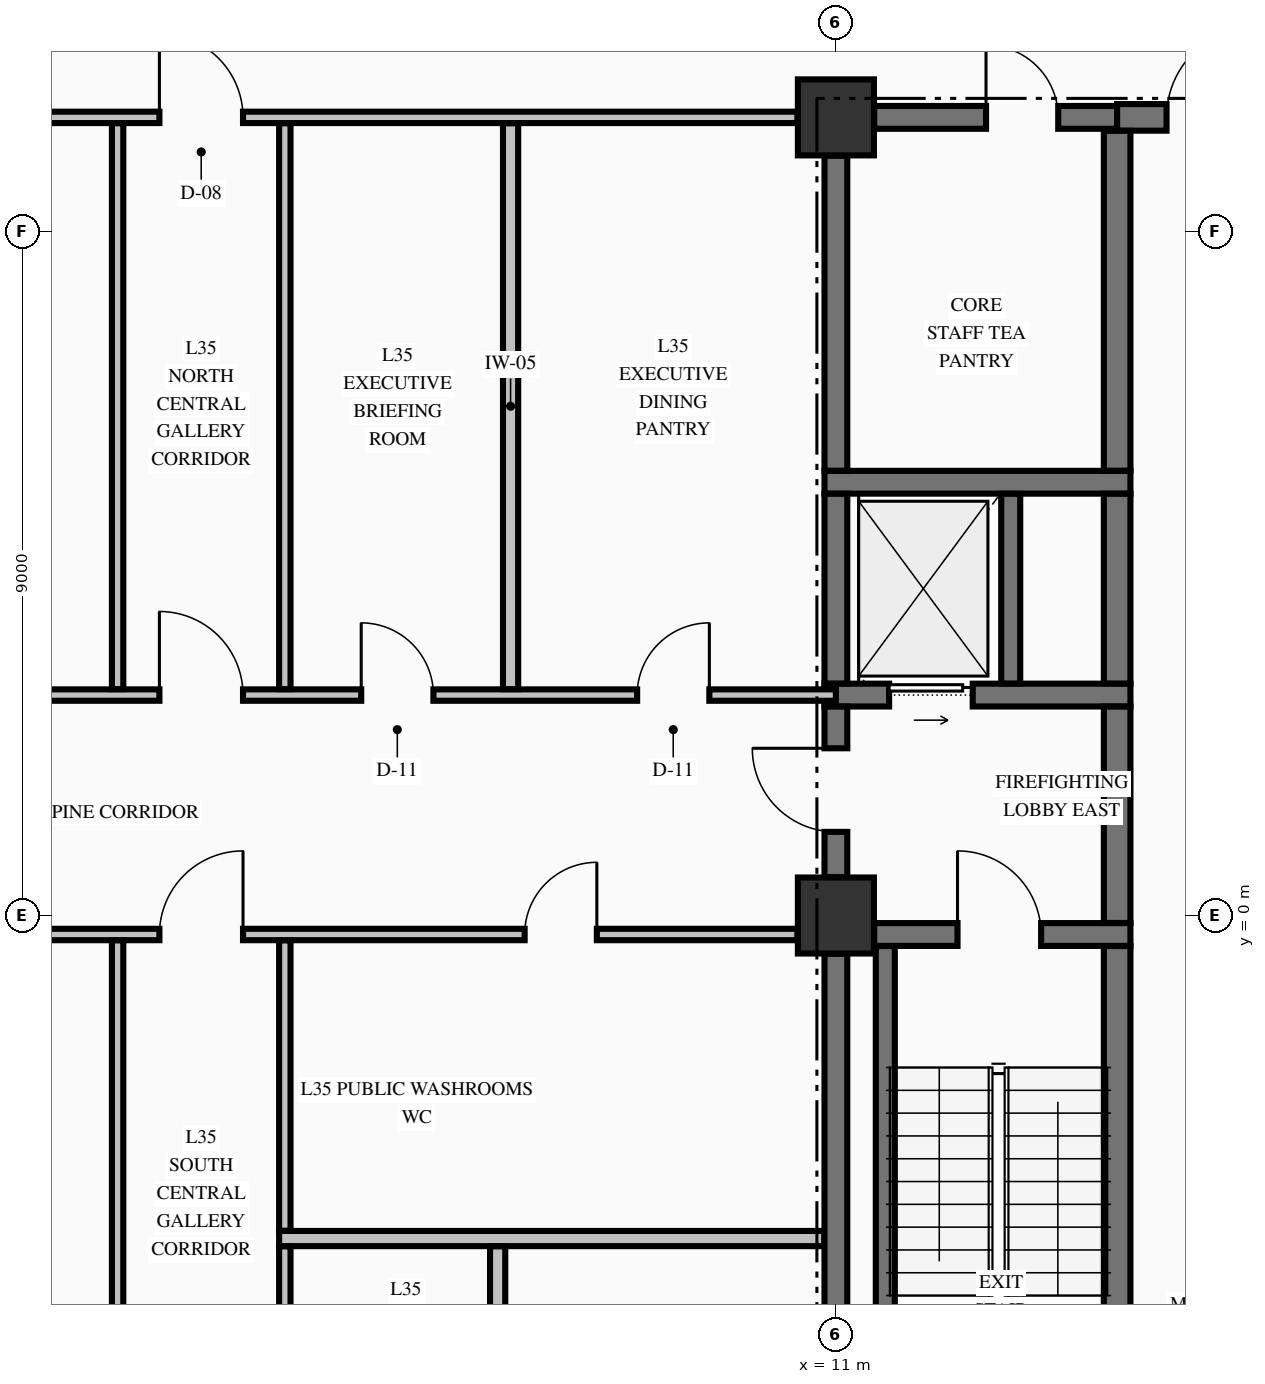
"""IFC4 building model, lengths in metres.
Left out: names, types, materials, properties, quantities, classifications, styles, units other than length and angle.
Written with IfcOpenShell. Run it as: python <this file> out.ifc"""

import sys

from ifc_helpers import new_model, si_unit, direction, frame, frame_2d, origin, origin_2d, place, context, subcontext, project, spatial, rectangle, extrude, element, fill, save


model = new_model("IFC4")
c1 = context("Model", 3, precision=1e-05, world=origin(), true_north=direction((0.0, 1.0)))
c2 = subcontext(c1, "Body", "Model", "MODEL_VIEW")
j1 = project(units=[si_unit("LENGTHUNIT", "METRE"), si_unit("PLANEANGLEUNIT", "RADIAN")], contexts=[c1])
p1 = place(None, origin())
s1 = spatial("IfcSite", under=j1, at=p1, CompositionType="ELEMENT")
p2 = place(p1, origin())
s2 = spatial("IfcBuilding", under=s1, at=p2, CompositionType="ELEMENT")
p3 = place(p2, frame((0.0, 0.0, 139.2)))
s3 = spatial("IfcBuildingStorey", under=s2, at=p3, CompositionType="ELEMENT", Elevation=139.2)
for number, where, z_axis, x_axis in (
    (1, (11.0, 0.0, -0.25), (0.0, 0.0, 1.0), (1.0, 0.0, 0.0)),
    (2, (11.0, 10.5, -0.25), (0.0, 0.0, 1.0), (1.0, 0.0, 0.0)),
):
    element("IfcColumn", number, at=place(p3, frame(where, z_axis=z_axis, x_axis=x_axis)), inside=s3, PredefinedType="COLUMN", context=c2, shape_type="SweptSolid", body=[
        extrude(rectangle(XDim=1.0, YDim=1.0, at=origin_2d()), origin(), (0.0, 0.0, 1.0), 3.495),
    ])
p4 = place(p3, frame((11.504, -0.25, 0.0), z_axis=(0.0, 0.0, 1.0), x_axis=(1.0, 0.0, 0.0)))
e3 = element("IfcWall", 3, at=p4, inside=s3, PredefinedType="SHEAR", context=c2, shape_type="SweptSolid", body=[
    extrude(rectangle(XDim=3.371, YDim=0.3, at=frame_2d((1.686, 0.0))), origin(), (0.0, 0.0, 1.0), 3.245),
])
p5 = place(p4, frame((1.096, 0.0, 0.0)))
e4 = element("IfcOpeningElement", 4, at=p5, cuts=e3, PredefinedType="OPENING", context=c2, shape_type="SweptSolid", body=[
    extrude(rectangle(XDim=1.1, YDim=2.15, at=frame_2d((0.55, 1.075))), frame((0.0, 0.16, 0.0), z_axis=(0.0, -1.0, 0.0), x_axis=(1.0, 0.0, 0.0)), (0.0, 0.0, 1.0), 0.32),
])
p6 = place(p3, frame((10.85, 2.9, 0.0), z_axis=(0.0, 0.0, 1.0), x_axis=(1.0, 0.0, 0.0)))
e5 = element("IfcWall", 5, at=p6, inside=s3, PredefinedType="SHEAR", context=c2, shape_type="SweptSolid", body=[
    extrude(rectangle(XDim=4.025, YDim=0.3, at=frame_2d((2.012, 0.0))), origin(), (0.0, 0.0, 1.0), 3.245),
])
p7 = place(p6, frame((0.85, 0.0, 0.0)))
e6 = element("IfcOpeningElement", 6, at=p7, cuts=e5, PredefinedType="OPENING", context=c2, shape_type="SweptSolid", body=[
    extrude(rectangle(XDim=1.1, YDim=2.2, at=frame_2d((0.55, 1.1))), frame((0.0, 0.16, 0.0), z_axis=(0.0, -1.0, 0.0), x_axis=(1.0, 0.0, 0.0)), (0.0, 0.0, 1.0), 0.32),
])
p8 = place(p3, frame((10.85, 5.7, 0.0), z_axis=(0.0, 0.0, 1.0), x_axis=(1.0, 0.0, 0.0)))
e7 = element("IfcWall", 7, at=p8, inside=s3, PredefinedType="SHEAR", context=c2, shape_type="SweptSolid", body=[
    extrude(rectangle(XDim=4.025, YDim=0.3, at=frame_2d((2.012, 0.0))), origin(), (0.0, 0.0, 1.0), 3.245),
])
p9 = place(p3, frame((11.504, 10.5, 0.0), z_axis=(0.0, 0.0, 1.0), x_axis=(1.0, 0.0, 0.0)))
e8 = element("IfcWall", 8, at=p9, inside=s3, PredefinedType="SHEAR", context=c2, shape_type="SweptSolid", body=[
    extrude(rectangle(XDim=3.196, YDim=0.3, at=frame_2d((1.598, 0.0))), origin(), (0.0, 0.0, 1.0), 3.245),
])
p10 = place(p9, frame((1.471, 0.0, 0.0)))
e9 = element("IfcOpeningElement", 9, at=p10, cuts=e8, PredefinedType="OPENING", context=c2, shape_type="SweptSolid", body=[
    extrude(rectangle(XDim=0.95, YDim=2.15, at=frame_2d((0.475, 1.075))), frame((0.0, 0.16, 0.0), z_axis=(0.0, -1.0, 0.0), x_axis=(1.0, 0.0, 0.0)), (0.0, 0.0, 1.0), 0.32),
])
p11 = place(p3, frame((14.7, 10.5, 0.0), z_axis=(0.0, 0.0, 1.0), x_axis=(1.0, 0.0, 0.0)))
e10 = element("IfcWall", 10, at=p11, inside=s3, PredefinedType="SHEAR", context=c2, shape_type="SweptSolid", body=[
    extrude(rectangle(XDim=4.796, YDim=0.35, at=frame_2d((2.398, 0.0))), origin(), (0.0, 0.0, 1.0), 3.245),
])
p12 = place(p11, frame((0.65, 0.0, 0.0)))
e11 = element("IfcOpeningElement", 11, at=p12, cuts=e10, PredefinedType="OPENING", context=c2, shape_type="SweptSolid", body=[
    extrude(rectangle(XDim=1.2, YDim=2.15, at=frame_2d((0.6, 1.075))), frame((0.0, 0.185, 0.0), z_axis=(0.0, -1.0, 0.0), x_axis=(1.0, 0.0, 0.0)), (0.0, 0.0, 1.0), 0.37),
])
p13 = place(p11, frame((3.225, 0.0, 0.0)))
e12 = element("IfcOpeningElement", 12, at=p13, cuts=e10, PredefinedType="OPENING", context=c2, shape_type="SweptSolid", body=[
    extrude(rectangle(XDim=0.95, YDim=2.15, at=frame_2d((0.475, 1.075))), frame((0.0, 0.185, 0.0), z_axis=(0.0, -1.0, 0.0), x_axis=(1.0, 0.0, 0.0)), (0.0, 0.0, 1.0), 0.37),
])
p14 = place(p3, frame((3.675, -4.25, 0.0), z_axis=(0.0, 0.0, 1.0), x_axis=(1.0, 0.0, 0.0)))
e13 = element("IfcWall", 13, at=p14, inside=s3, PredefinedType="PARTITIONING", context=c2, shape_type="SweptSolid", body=[
    extrude(rectangle(XDim=7.172, YDim=0.2, at=frame_2d((3.586, 0.0))), origin(), (0.0, 0.0, 1.0), 3.245),
])
p15 = place(p3, frame((-10.494, -0.25, 0.0), z_axis=(0.0, 0.0, 1.0), x_axis=(1.0, 0.0, 0.0)))
e14 = element("IfcWall", 14, at=p15, inside=s3, PredefinedType="PARTITIONING", context=c2, shape_type="SweptSolid", body=[
    extrude(rectangle(XDim=20.988, YDim=0.15, at=frame_2d((10.494, 0.0))), origin(), (0.0, 0.0, 1.0), 3.245),
])
p16 = place(p15, frame((12.594, 0.0, 0.0)))
e15 = element("IfcOpeningElement", 15, at=p16, cuts=e14, PredefinedType="OPENING", context=c2, shape_type="SweptSolid", body=[
    extrude(rectangle(XDim=1.1, YDim=2.15, at=frame_2d((0.55, 1.075))), frame((0.0, 0.085, 0.0), z_axis=(0.0, -1.0, 0.0), x_axis=(1.0, 0.0, 0.0)), (0.0, 0.0, 1.0), 0.17),
])
p17 = place(p15, frame((5.249, 0.0, 0.0)))
e16 = element("IfcOpeningElement", 16, at=p17, cuts=e14, PredefinedType="OPENING", context=c2, shape_type="SweptSolid", body=[
    extrude(rectangle(XDim=1.05, YDim=2.15, at=frame_2d((0.525, 1.075))), frame((0.0, 0.085, 0.0), z_axis=(0.0, -1.0, 0.0), x_axis=(1.0, 0.0, 0.0)), (0.0, 0.0, 1.0), 0.17),
])
p18 = place(p15, frame((17.399, 0.0, 0.0)))
e17 = element("IfcOpeningElement", 17, at=p18, cuts=e14, PredefinedType="OPENING", context=c2, shape_type="SweptSolid", body=[
    extrude(rectangle(XDim=0.95, YDim=2.15, at=frame_2d((0.475, 1.075))), frame((0.0, 0.085, 0.0), z_axis=(0.0, -1.0, 0.0), x_axis=(1.0, 0.0, 0.0)), (0.0, 0.0, 1.0), 0.17),
])
p19 = place(p3, frame((-11.0, 2.9, 0.0), z_axis=(0.0, 0.0, 1.0), x_axis=(1.0, 0.0, 0.0)))
e18 = element("IfcWall", 18, at=p19, inside=s3, PredefinedType="PARTITIONING", context=c2, shape_type="SweptSolid", body=[
    extrude(rectangle(XDim=22.0, YDim=0.15, at=frame_2d((11.0, 0.0))), origin(), (0.0, 0.0, 1.0), 3.245),
])
p20 = place(p19, frame((13.1, 0.0, 0.0)))
e19 = element("IfcOpeningElement", 19, at=p20, cuts=e18, PredefinedType="OPENING", context=c2, shape_type="SweptSolid", body=[
    extrude(rectangle(XDim=1.1, YDim=2.15, at=frame_2d((0.55, 1.075))), frame((0.0, 0.085, 0.0), z_axis=(0.0, -1.0, 0.0), x_axis=(1.0, 0.0, 0.0)), (0.0, 0.0, 1.0), 0.17),
])
p21 = place(p19, frame((5.755, 0.0, 0.0)))
e20 = element("IfcOpeningElement", 20, at=p21, cuts=e18, PredefinedType="OPENING", context=c2, shape_type="SweptSolid", body=[
    extrude(rectangle(XDim=1.05, YDim=2.15, at=frame_2d((0.525, 1.075))), frame((0.0, 0.085, 0.0), z_axis=(0.0, -1.0, 0.0), x_axis=(1.0, 0.0, 0.0)), (0.0, 0.0, 1.0), 0.17),
])
p22 = place(p19, frame((15.755, 0.0, 0.0)))
e21 = element("IfcOpeningElement", 21, at=p22, cuts=e18, PredefinedType="OPENING", context=c2, shape_type="SweptSolid", body=[
    extrude(rectangle(XDim=0.95, YDim=2.15, at=frame_2d((0.475, 1.075))), frame((0.0, 0.085, 0.0), z_axis=(0.0, -1.0, 0.0), x_axis=(1.0, 0.0, 0.0)), (0.0, 0.0, 1.0), 0.17),
])
p23 = place(p19, frame((19.385, 0.0, 0.0)))
e22 = element("IfcOpeningElement", 22, at=p23, cuts=e18, PredefinedType="OPENING", context=c2, shape_type="SweptSolid", body=[
    extrude(rectangle(XDim=0.95, YDim=2.15, at=frame_2d((0.475, 1.075))), frame((0.0, 0.085, 0.0), z_axis=(0.0, -1.0, 0.0), x_axis=(1.0, 0.0, 0.0)), (0.0, 0.0, 1.0), 0.17),
])
p24 = place(p3, frame((-10.494, 10.5, 0.0), z_axis=(0.0, 0.0, 1.0), x_axis=(1.0, 0.0, 0.0)))
e23 = element("IfcWall", 23, at=p24, inside=s3, PredefinedType="PARTITIONING", context=c2, shape_type="SweptSolid", body=[
    extrude(rectangle(XDim=20.988, YDim=0.15, at=frame_2d((10.494, 0.0))), origin(), (0.0, 0.0, 1.0), 3.245),
])
p25 = place(p24, frame((12.594, 0.0, 0.0)))
e24 = element("IfcOpeningElement", 24, at=p25, cuts=e23, PredefinedType="OPENING", context=c2, shape_type="SweptSolid", body=[
    extrude(rectangle(XDim=1.1, YDim=2.15, at=frame_2d((0.55, 1.075))), frame((0.0, 0.085, 0.0), z_axis=(0.0, -1.0, 0.0), x_axis=(1.0, 0.0, 0.0)), (0.0, 0.0, 1.0), 0.17),
])
p26 = place(p3, frame((11.0, -9.446, 0.0), z_axis=(0.0, 0.0, 1.0), x_axis=(0.0, 1.0, 0.0)))
e25 = element("IfcWall", 25, at=p26, inside=s3, PredefinedType="SHEAR", context=c2, shape_type="SweptSolid", body=[
    extrude(rectangle(XDim=8.942, YDim=0.3, at=frame_2d((4.471, 0.0))), origin(), (0.0, 0.0, 1.0), 3.245),
])
p27 = place(p3, frame((11.0, 0.504, 0.0), z_axis=(0.0, 0.0, 1.0), x_axis=(0.0, 1.0, 0.0)))
e26 = element("IfcWall", 26, at=p27, inside=s3, PredefinedType="SHEAR", context=c2, shape_type="SweptSolid", body=[
    extrude(rectangle(XDim=2.244, YDim=0.3, at=frame_2d((1.122, 0.0))), origin(), (0.0, 0.0, 1.0), 3.245),
])
p28 = place(p27, frame((0.596, 0.0, 0.0)))
e27 = element("IfcOpeningElement", 27, at=p28, cuts=e26, PredefinedType="OPENING", context=c2, shape_type="SweptSolid", body=[
    extrude(rectangle(XDim=1.1, YDim=2.15, at=frame_2d((0.55, 1.075))), frame((0.0, 0.16, 0.0), z_axis=(0.0, -1.0, 0.0), x_axis=(1.0, 0.0, 0.0)), (0.0, 0.0, 1.0), 0.32),
])
p29 = place(p3, frame((11.0, 3.052, 0.0), z_axis=(0.0, 0.0, 1.0), x_axis=(0.0, 1.0, 0.0)))
e28 = element("IfcWall", 28, at=p29, inside=s3, PredefinedType="SHEAR", context=c2, shape_type="SweptSolid", body=[
    extrude(rectangle(XDim=2.496, YDim=0.3, at=frame_2d((1.248, 0.0))), origin(), (0.0, 0.0, 1.0), 3.245),
])
p30 = place(p3, frame((11.0, 5.852, 0.0), z_axis=(0.0, 0.0, 1.0), x_axis=(0.0, 1.0, 0.0)))
e29 = element("IfcWall", 29, at=p30, inside=s3, PredefinedType="SHEAR", context=c2, shape_type="SweptSolid", body=[
    extrude(rectangle(XDim=4.144, YDim=0.3, at=frame_2d((2.072, 0.0))), origin(), (0.0, 0.0, 1.0), 3.245),
])
p31 = place(p3, frame((11.65, -9.798, 0.0), z_axis=(0.0, 0.0, 1.0), x_axis=(0.0, 1.0, 0.0)))
e30 = element("IfcWall", 30, at=p31, inside=s3, PredefinedType="SOLIDWALL", context=c2, shape_type="SweptSolid", body=[
    extrude(rectangle(XDim=9.396, YDim=0.25, at=frame_2d((4.698, 0.0))), origin(), (0.0, 0.0, 1.0), 3.245),
])
p32 = place(p3, frame((13.3, 3.052, 0.0), z_axis=(0.0, 0.0, 1.0), x_axis=(0.0, 1.0, 0.0)))
e31 = element("IfcWall", 31, at=p32, inside=s3, PredefinedType="SOLIDWALL", context=c2, shape_type="SweptSolid", body=[
    extrude(rectangle(XDim=2.496, YDim=0.25, at=frame_2d((1.248, 0.0))), origin(), (0.0, 0.0, 1.0), 3.245),
])
p33 = place(p3, frame((14.7, -9.773, 0.0), z_axis=(0.0, 0.0, 1.0), x_axis=(0.0, 1.0, 0.0)))
e32 = element("IfcWall", 32, at=p33, inside=s3, PredefinedType="SHEAR", context=c2, shape_type="SweptSolid", body=[
    extrude(rectangle(XDim=9.371, YDim=0.35, at=frame_2d((4.686, 0.0))), origin(), (0.0, 0.0, 1.0), 3.245),
])
p34 = place(p3, frame((14.7, -0.098, 0.0), z_axis=(0.0, 0.0, 1.0), x_axis=(0.0, 1.0, 0.0)))
e33 = element("IfcWall", 33, at=p34, inside=s3, PredefinedType="SHEAR", context=c2, shape_type="SweptSolid", body=[
    extrude(rectangle(XDim=2.846, YDim=0.35, at=frame_2d((1.423, 0.0))), origin(), (0.0, 0.0, 1.0), 3.245),
])
p35 = place(p3, frame((14.7, 3.052, 0.0), z_axis=(0.0, 0.0, 1.0), x_axis=(0.0, 1.0, 0.0)))
e34 = element("IfcWall", 34, at=p35, inside=s3, PredefinedType="SHEAR", context=c2, shape_type="SweptSolid", body=[
    extrude(rectangle(XDim=2.496, YDim=0.35, at=frame_2d((1.248, 0.0))), origin(), (0.0, 0.0, 1.0), 3.245),
])
p36 = place(p3, frame((14.7, 5.852, 0.0), z_axis=(0.0, 0.0, 1.0), x_axis=(0.0, 1.0, 0.0)))
e35 = element("IfcWall", 35, at=p36, inside=s3, PredefinedType="SHEAR", context=c2, shape_type="SweptSolid", body=[
    extrude(rectangle(XDim=4.471, YDim=0.35, at=frame_2d((2.235, 0.0))), origin(), (0.0, 0.0, 1.0), 3.245),
])
p37 = place(p3, frame((1.55, -9.872, 0.0), z_axis=(0.0, 0.0, 1.0), x_axis=(0.0, 1.0, 0.0)))
e36 = element("IfcWall", 36, at=p37, inside=s3, PredefinedType="PARTITIONING", context=c2, shape_type="SweptSolid", body=[
    extrude(rectangle(XDim=9.544, YDim=0.15, at=frame_2d((4.772, 0.0))), origin(), (0.0, 0.0, 1.0), 3.245),
])
p38 = place(p3, frame((1.55, 2.978, 0.0), z_axis=(0.0, 0.0, 1.0), x_axis=(0.0, 1.0, 0.0)))
e37 = element("IfcWall", 37, at=p38, inside=s3, PredefinedType="PARTITIONING", context=c2, shape_type="SweptSolid", body=[
    extrude(rectangle(XDim=7.444, YDim=0.15, at=frame_2d((3.722, 0.0))), origin(), (0.0, 0.0, 1.0), 3.245),
])
p39 = place(p3, frame((3.75, -9.872, 0.0), z_axis=(0.0, 0.0, 1.0), x_axis=(0.0, 1.0, 0.0)))
e38 = element("IfcWall", 38, at=p39, inside=s3, PredefinedType="PARTITIONING", context=c2, shape_type="SweptSolid", body=[
    extrude(rectangle(XDim=5.519, YDim=0.15, at=frame_2d((2.76, 0.0))), origin(), (0.0, 0.0, 1.0), 3.245),
])
p40 = place(p39, frame((1.997, 0.0, 0.0)))
e39 = element("IfcOpeningElement", 39, at=p40, cuts=e38, PredefinedType="OPENING", context=c2, shape_type="SweptSolid", body=[
    extrude(rectangle(XDim=0.95, YDim=2.15, at=frame_2d((0.475, 1.075))), frame((0.0, 0.085, 0.0), z_axis=(0.0, -1.0, 0.0), x_axis=(1.0, 0.0, 0.0)), (0.0, 0.0, 1.0), 0.17),
])
p41 = place(p3, frame((3.75, -4.147, 0.0), z_axis=(0.0, 0.0, 1.0), x_axis=(0.0, 1.0, 0.0)))
e40 = element("IfcWall", 40, at=p41, inside=s3, PredefinedType="PARTITIONING", context=c2, shape_type="SweptSolid", body=[
    extrude(rectangle(XDim=3.819, YDim=0.15, at=frame_2d((1.91, 0.0))), origin(), (0.0, 0.0, 1.0), 3.245),
])
p42 = place(p3, frame((3.75, 2.978, 0.0), z_axis=(0.0, 0.0, 1.0), x_axis=(0.0, 1.0, 0.0)))
e41 = element("IfcWall", 41, at=p42, inside=s3, PredefinedType="PARTITIONING", context=c2, shape_type="SweptSolid", body=[
    extrude(rectangle(XDim=7.444, YDim=0.15, at=frame_2d((3.722, 0.0))), origin(), (0.0, 0.0, 1.0), 3.245),
])
p43 = place(p3, frame((6.55, -9.872, 0.0), z_axis=(0.0, 0.0, 1.0), x_axis=(0.0, 1.0, 0.0)))
e42 = element("IfcWall", 42, at=p43, inside=s3, PredefinedType="PARTITIONING", context=c2, shape_type="SweptSolid", body=[
    extrude(rectangle(XDim=5.519, YDim=0.2, at=frame_2d((2.76, 0.0))), origin(), (0.0, 0.0, 1.0), 3.245),
])
p44 = place(p3, frame((6.72, 2.978, 0.0), z_axis=(0.0, 0.0, 1.0), x_axis=(0.0, 1.0, 0.0)))
e43 = element("IfcWall", 43, at=p44, inside=s3, PredefinedType="PARTITIONING", context=c2, shape_type="SweptSolid", body=[
    extrude(rectangle(XDim=7.444, YDim=0.2, at=frame_2d((3.722, 0.0))), origin(), (0.0, 0.0, 1.0), 3.245),
])
p45 = place(p5, origin())
e44 = element("IfcDoor", 44, at=p45, inside=s3, OperationType="SINGLE_SWING_LEFT", PredefinedType="DOOR", context=c2, shape_type="SweptSolid", body=[
    extrude(rectangle(XDim=1.1, YDim=2.15, at=frame_2d((0.55, 1.075))), frame((0.0, 0.025, 0.0), z_axis=(0.0, -1.0, 0.0), x_axis=(1.0, 0.0, 0.0)), (0.0, 0.0, 1.0), 0.05),
])
fill(e4, e44)
p46 = place(p28, origin())
e45 = element("IfcDoor", 45, at=p46, inside=s3, OperationType="SINGLE_SWING_RIGHT", PredefinedType="DOOR", context=c2, shape_type="SweptSolid", body=[
    extrude(rectangle(XDim=1.1, YDim=2.15, at=frame_2d((0.55, 1.075))), frame((0.0, 0.025, 0.0), z_axis=(0.0, -1.0, 0.0), x_axis=(1.0, 0.0, 0.0)), (0.0, 0.0, 1.0), 0.05),
])
fill(e27, e45)
p47 = place(p7, origin())
e46 = element("IfcDoor", 46, at=p47, inside=s3, OperationType="SLIDING_TO_RIGHT", PredefinedType="DOOR", context=c2, shape_type="SweptSolid", body=[
    extrude(rectangle(XDim=1.1, YDim=2.2, at=frame_2d((0.55, 1.1))), frame((0.0, 0.025, 0.0), z_axis=(0.0, -1.0, 0.0), x_axis=(1.0, 0.0, 0.0)), (0.0, 0.0, 1.0), 0.05),
])
fill(e6, e46)
p48 = place(p10, origin())
e47 = element("IfcDoor", 47, at=p48, inside=s3, OperationType="SINGLE_SWING_LEFT", PredefinedType="DOOR", context=c2, shape_type="SweptSolid", body=[
    extrude(rectangle(XDim=0.95, YDim=2.15, at=frame_2d((0.475, 1.075))), frame((0.0, 0.025, 0.0), z_axis=(0.0, -1.0, 0.0), x_axis=(1.0, 0.0, 0.0)), (0.0, 0.0, 1.0), 0.05),
])
fill(e9, e47)
p49 = place(p12, origin())
e48 = element("IfcDoor", 48, at=p49, inside=s3, OperationType="SINGLE_SWING_RIGHT", PredefinedType="DOOR", context=c2, shape_type="SweptSolid", body=[
    extrude(rectangle(XDim=1.2, YDim=2.15, at=frame_2d((0.6, 1.075))), frame((0.0, 0.025, 0.0), z_axis=(0.0, -1.0, 0.0), x_axis=(1.0, 0.0, 0.0)), (0.0, 0.0, 1.0), 0.05),
])
fill(e11, e48)
p50 = place(p25, origin())
e49 = element("IfcDoor", 49, at=p50, inside=s3, OperationType="SINGLE_SWING_LEFT", PredefinedType="DOOR", context=c2, shape_type="SweptSolid", body=[
    extrude(rectangle(XDim=1.1, YDim=2.15, at=frame_2d((0.55, 1.075))), frame((0.0, 0.025, 0.0), z_axis=(0.0, -1.0, 0.0), x_axis=(1.0, 0.0, 0.0)), (0.0, 0.0, 1.0), 0.05),
])
fill(e24, e49)
p51 = place(p20, origin())
e50 = element("IfcDoor", 50, at=p51, inside=s3, OperationType="SINGLE_SWING_LEFT", PredefinedType="DOOR", context=c2, shape_type="SweptSolid", body=[
    extrude(rectangle(XDim=1.1, YDim=2.15, at=frame_2d((0.55, 1.075))), frame((0.0, 0.025, 0.0), z_axis=(0.0, -1.0, 0.0), x_axis=(1.0, 0.0, 0.0)), (0.0, 0.0, 1.0), 0.05),
])
fill(e19, e50)
p52 = place(p16, origin())
e51 = element("IfcDoor", 51, at=p52, inside=s3, OperationType="SINGLE_SWING_RIGHT", PredefinedType="DOOR", context=c2, shape_type="SweptSolid", body=[
    extrude(rectangle(XDim=1.1, YDim=2.15, at=frame_2d((0.55, 1.075))), frame((0.0, 0.025, 0.0), z_axis=(0.0, -1.0, 0.0), x_axis=(1.0, 0.0, 0.0)), (0.0, 0.0, 1.0), 0.05),
])
fill(e15, e51)
p53 = place(p22, origin())
e52 = element("IfcDoor", 52, at=p53, inside=s3, OperationType="SINGLE_SWING_LEFT", PredefinedType="DOOR", context=c2, shape_type="SweptSolid", body=[
    extrude(rectangle(XDim=0.95, YDim=2.15, at=frame_2d((0.475, 1.075))), frame((0.0, 0.025, 0.0), z_axis=(0.0, -1.0, 0.0), x_axis=(1.0, 0.0, 0.0)), (0.0, 0.0, 1.0), 0.05),
])
fill(e21, e52)
p54 = place(p23, origin())
e53 = element("IfcDoor", 53, at=p54, inside=s3, OperationType="SINGLE_SWING_RIGHT", PredefinedType="DOOR", context=c2, shape_type="SweptSolid", body=[
    extrude(rectangle(XDim=0.95, YDim=2.15, at=frame_2d((0.475, 1.075))), frame((0.0, 0.025, 0.0), z_axis=(0.0, -1.0, 0.0), x_axis=(1.0, 0.0, 0.0)), (0.0, 0.0, 1.0), 0.05),
])
fill(e22, e53)
p55 = place(p18, origin())
e54 = element("IfcDoor", 54, at=p55, inside=s3, OperationType="SINGLE_SWING_RIGHT", PredefinedType="DOOR", context=c2, shape_type="SweptSolid", body=[
    extrude(rectangle(XDim=0.95, YDim=2.15, at=frame_2d((0.475, 1.075))), frame((0.0, 0.025, 0.0), z_axis=(0.0, -1.0, 0.0), x_axis=(1.0, 0.0, 0.0)), (0.0, 0.0, 1.0), 0.05),
])
fill(e17, e54)
save(model, sys.argv[1])
